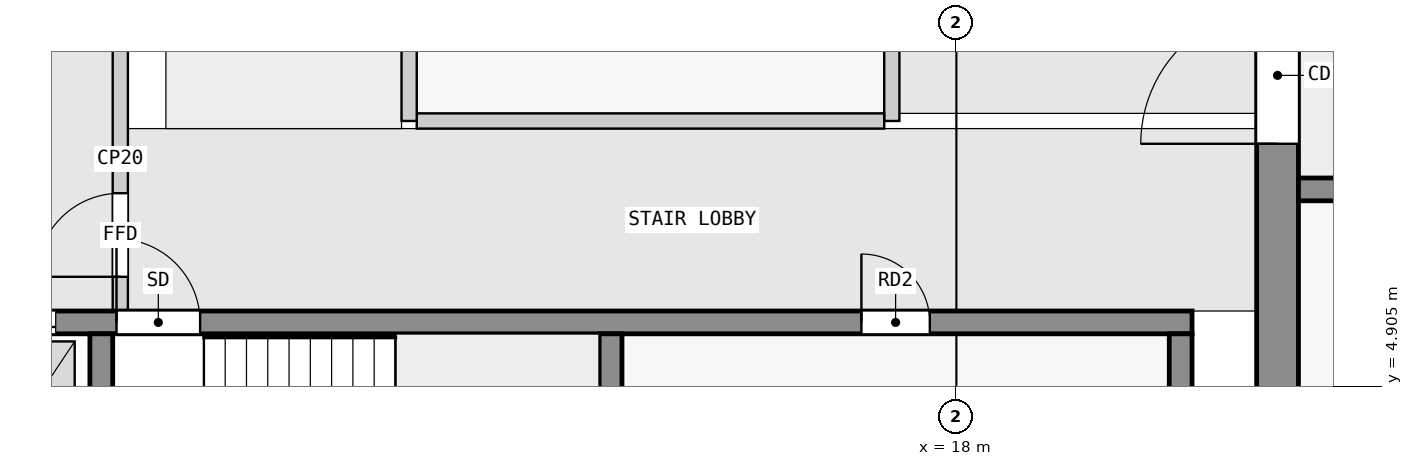
"""IFC4 building model, lengths in metres.
Left out: names, types, materials, properties, quantities, classifications, styles, units other than length and angle.
Written with IfcOpenShell. Run it as: python <this file> out.ifc"""

import sys

from ifc_helpers import new_model, si_unit, direction, frame, frame_2d, origin, place, context, subcontext, project, spatial, rectangle, extrude, element, fill, save


model = new_model("IFC4")
c1 = context("Model", 3, precision=1e-05, world=origin(), true_north=direction((0.0, 1.0)))
c2 = subcontext(c1, "Body", "Model", "MODEL_VIEW")
j1 = project(units=[si_unit("LENGTHUNIT", "METRE"), si_unit("PLANEANGLEUNIT", "RADIAN")], contexts=[c1])
p1 = place(None, origin())
s1 = spatial("IfcSite", under=j1, at=p1, CompositionType="ELEMENT")
p2 = place(p1, origin())
s2 = spatial("IfcBuilding", under=s1, at=p2, CompositionType="ELEMENT")
p3 = place(p2, frame((0.0, 0.0, 181.4)))
s3 = spatial("IfcBuildingStorey", under=s2, at=p3, CompositionType="ELEMENT", Elevation=181.4)
p4 = place(p3, frame((22.225, 2.5, 0.0), z_axis=(0.0, 0.0, 1.0), x_axis=(0.0, 1.0, 0.0)))
e1 = element("IfcWall", 1, at=p4, inside=s3, PredefinedType="SHEAR", context=c2, shape_type="SweptSolid", body=[
    extrude(rectangle(XDim=14.95, YDim=0.55, at=frame_2d((7.475, 0.0))), origin(), (0.0, 0.0, 1.0), 3.2),
])
p5 = place(p4, frame((5.6, 0.0, 0.0)))
e2 = element("IfcOpeningElement", 2, at=p5, cuts=e1, PredefinedType="OPENING", context=c2, shape_type="SweptSolid", body=[
    extrude(rectangle(XDim=1.8, YDim=2.1, at=frame_2d((0.9, 1.05))), frame((0.0, 0.285, 0.0), z_axis=(0.0, -1.0, 0.0), x_axis=(1.0, 0.0, 0.0)), (0.0, 0.0, 1.0), 0.57),
])
for number, where, z_axis, x_axis in (
    (3, (6.75, 2.8, 0.0), (0.0, 0.0, 1.0), (0.0, 1.0, 0.0)),
    (4, (13.45, 2.8, 0.0), (0.0, 0.0, 1.0), (0.0, 1.0, 0.0)),
    (5, (20.95, 2.8, 0.0), (0.0, 0.0, 1.0), (0.0, 1.0, 0.0)),
):
    element("IfcWall", number, at=place(p3, frame(where, z_axis=z_axis, x_axis=x_axis)), inside=s3, PredefinedType="SHEAR", context=c2, shape_type="SweptSolid", body=[
        extrude(rectangle(XDim=2.8, YDim=0.3, at=frame_2d((1.4, 0.0))), origin(), (0.0, 0.0, 1.0), 3.2),
    ])
p6 = place(p3, frame((2.3, 5.75, 0.0), z_axis=(0.0, 0.0, 1.0), x_axis=(1.0, 0.0, 0.0)))
e6 = element("IfcWall", 6, at=p6, inside=s3, PredefinedType="SHEAR", context=c2, shape_type="SweptSolid", body=[
    extrude(rectangle(XDim=18.8, YDim=0.3, at=frame_2d((9.4, 0.0))), origin(), (0.0, 0.0, 1.0), 3.2),
])
p7 = place(p6, frame((4.65, 0.0, 0.0)))
e7 = element("IfcOpeningElement", 7, at=p7, cuts=e6, PredefinedType="OPENING", context=c2, shape_type="SweptSolid", body=[
    extrude(rectangle(XDim=1.1, YDim=2.1, at=frame_2d((0.55, 1.05))), frame((0.0, 0.16, 0.0), z_axis=(0.0, -1.0, 0.0), x_axis=(1.0, 0.0, 0.0)), (0.0, 0.0, 1.0), 0.32),
])
p8 = place(p6, frame((0.45, 0.0, 0.0)))
e8 = element("IfcOpeningElement", 8, at=p8, cuts=e6, PredefinedType="OPENING", context=c2, shape_type="SweptSolid", body=[
    extrude(rectangle(XDim=1.1, YDim=2.1, at=frame_2d((0.55, 1.05))), frame((0.0, 0.16, 0.0), z_axis=(0.0, -1.0, 0.0), x_axis=(1.0, 0.0, 0.0)), (0.0, 0.0, 1.0), 0.32),
])
p9 = place(p6, frame((2.75, 0.0, 0.0)))
e9 = element("IfcOpeningElement", 9, at=p9, cuts=e6, PredefinedType="OPENING", context=c2, shape_type="SweptSolid", body=[
    extrude(rectangle(XDim=1.1, YDim=2.1, at=frame_2d((0.55, 1.05))), frame((0.0, 0.16, 0.0), z_axis=(0.0, -1.0, 0.0), x_axis=(1.0, 0.0, 0.0)), (0.0, 0.0, 1.0), 0.32),
])
p10 = place(p6, frame((14.45, 0.0, 0.0)))
e10 = element("IfcOpeningElement", 10, at=p10, cuts=e6, PredefinedType="OPENING", context=c2, shape_type="SweptSolid", body=[
    extrude(rectangle(XDim=0.9, YDim=2.1, at=frame_2d((0.45, 1.05))), frame((0.0, 0.16, 0.0), z_axis=(0.0, -1.0, 0.0), x_axis=(1.0, 0.0, 0.0)), (0.0, 0.0, 1.0), 0.32),
])
p11 = place(p3, frame((22.5, 7.5, 0.0), z_axis=(0.0, 0.0, 1.0), x_axis=(1.0, 0.0, 0.0)))
e11 = element("IfcWall", 11, at=p11, inside=s3, PredefinedType="SHEAR", context=c2, shape_type="SweptSolid", body=[
    extrude(rectangle(XDim=22.5, YDim=0.3, at=frame_2d((11.25, 0.0))), origin(), (0.0, 0.0, 1.0), 3.2),
])
p12 = place(p11, frame((3.65, 0.0, 0.0)))
e12 = element("IfcOpeningElement", 12, at=p12, cuts=e11, PredefinedType="OPENING", context=c2, shape_type="SweptSolid", body=[
    extrude(rectangle(XDim=1.8, YDim=2.1, at=frame_2d((0.9, 1.05))), frame((0.0, 0.16, 0.0), z_axis=(0.0, -1.0, 0.0), x_axis=(1.0, 0.0, 0.0)), (0.0, 0.0, 1.0), 0.32),
])
p13 = place(p11, frame((12.65, 0.0, 0.0)))
e13 = element("IfcOpeningElement", 13, at=p13, cuts=e11, PredefinedType="OPENING", context=c2, shape_type="SweptSolid", body=[
    extrude(rectangle(XDim=1.8, YDim=2.1, at=frame_2d((0.9, 1.05))), frame((0.0, 0.16, 0.0), z_axis=(0.0, -1.0, 0.0), x_axis=(1.0, 0.0, 0.0)), (0.0, 0.0, 1.0), 0.32),
])
p14 = place(p11, frame((18.75, 0.0, 0.0)))
e14 = element("IfcOpeningElement", 14, at=p14, cuts=e11, PredefinedType="OPENING", context=c2, shape_type="SweptSolid", body=[
    extrude(rectangle(XDim=0.9, YDim=2.1, at=frame_2d((0.45, 1.05))), frame((0.0, 0.16, 0.0), z_axis=(0.0, -1.0, 0.0), x_axis=(1.0, 0.0, 0.0)), (0.0, 0.0, 1.0), 0.32),
])
p15 = place(p11, frame((20.95, 0.0, 0.0)))
e15 = element("IfcOpeningElement", 15, at=p15, cuts=e11, PredefinedType="OPENING", context=c2, shape_type="SweptSolid", body=[
    extrude(rectangle(XDim=1.0, YDim=2.1, at=frame_2d((0.5, 1.05))), frame((0.0, 0.16, 0.0), z_axis=(0.0, -1.0, 0.0), x_axis=(1.0, 0.0, 0.0)), (0.0, 0.0, 1.0), 0.32),
])
p16 = place(p3, frame((7.0, 5.9, 0.0), z_axis=(0.0, 0.0, 1.0), x_axis=(0.0, 1.0, 0.0)))
e16 = element("IfcWall", 16, at=p16, inside=s3, PredefinedType="PARTITIONING", context=c2, shape_type="SweptSolid", body=[
    extrude(rectangle(XDim=4.0, YDim=0.2, at=frame_2d((2.0, 0.0))), origin(), (0.0, 0.0, 1.0), 3.2),
])
p17 = place(p16, frame((0.45, 0.0, 0.0)))
e17 = element("IfcOpeningElement", 17, at=p17, cuts=e16, PredefinedType="OPENING", context=c2, shape_type="SweptSolid", body=[
    extrude(rectangle(XDim=1.1, YDim=2.1, at=frame_2d((0.55, 1.05))), frame((0.0, 0.11, 0.0), z_axis=(0.0, -1.0, 0.0), x_axis=(1.0, 0.0, 0.0)), (0.0, 0.0, 1.0), 0.22),
])
p18 = place(p3, frame((10.8, 8.4, 0.0), z_axis=(0.0, 0.0, 1.0), x_axis=(0.0, 1.0, 0.0)))
e18 = element("IfcWall", 18, at=p18, inside=s3, PredefinedType="PARTITIONING", context=c2, shape_type="SweptSolid", body=[
    extrude(rectangle(XDim=3.8, YDim=0.2, at=frame_2d((1.9, 0.0))), origin(), (0.0, 0.0, 1.0), 3.2),
])
p19 = place(p3, frame((10.9, 8.4, 0.0), z_axis=(0.0, 0.0, 1.0), x_axis=(1.0, 0.0, 0.0)))
e19 = element("IfcWall", 19, at=p19, inside=s3, PredefinedType="PARTITIONING", context=c2, shape_type="SweptSolid", body=[
    extrude(rectangle(XDim=6.15, YDim=0.2, at=frame_2d((3.075, 0.0))), origin(), (0.0, 0.0, 1.0), 3.2),
])
p20 = place(p3, frame((17.15, 8.4, 0.0), z_axis=(0.0, 0.0, 1.0), x_axis=(0.0, 1.0, 0.0)))
e20 = element("IfcWall", 20, at=p20, inside=s3, PredefinedType="PARTITIONING", context=c2, shape_type="SweptSolid", body=[
    extrude(rectangle(XDim=3.8, YDim=0.2, at=frame_2d((1.9, 0.0))), origin(), (0.0, 0.0, 1.0), 3.2),
])
p21 = place(p17, origin())
e21 = element("IfcDoor", 21, at=p21, inside=s3, OperationType="SINGLE_SWING_LEFT", PredefinedType="DOOR", context=c2, shape_type="SweptSolid", body=[
    extrude(rectangle(XDim=1.1, YDim=2.1, at=frame_2d((0.55, 1.05))), frame((0.0, 0.025, 0.0), z_axis=(0.0, -1.0, 0.0), x_axis=(1.0, 0.0, 0.0)), (0.0, 0.0, 1.0), 0.05),
])
fill(e17, e21)
p22 = place(p7, origin())
e22 = element("IfcDoor", 22, at=p22, inside=s3, OperationType="SINGLE_SWING_LEFT", PredefinedType="DOOR", context=c2, shape_type="SweptSolid", body=[
    extrude(rectangle(XDim=1.1, YDim=2.1, at=frame_2d((0.55, 1.05))), frame((0.0, 0.025, 0.0), z_axis=(0.0, -1.0, 0.0), x_axis=(1.0, 0.0, 0.0)), (0.0, 0.0, 1.0), 0.05),
])
fill(e7, e22)
p23 = place(p9, origin())
e23 = element("IfcDoor", 23, at=p23, inside=s3, OperationType="DOUBLE_DOOR_SLIDING", PredefinedType="DOOR", context=c2, shape_type="SweptSolid", body=[
    extrude(rectangle(XDim=1.1, YDim=2.1, at=frame_2d((0.55, 1.05))), frame((0.0, 0.025, 0.0), z_axis=(0.0, -1.0, 0.0), x_axis=(1.0, 0.0, 0.0)), (0.0, 0.0, 1.0), 0.05),
])
fill(e9, e23)
p24 = place(p5, origin())
e24 = element("IfcDoor", 24, at=p24, inside=s3, OperationType="DOUBLE_DOOR_SINGLE_SWING", PredefinedType="DOOR", context=c2, shape_type="SweptSolid", body=[
    extrude(rectangle(XDim=1.8, YDim=2.1, at=frame_2d((0.9, 1.05))), frame((0.0, 0.025, 0.0), z_axis=(0.0, -1.0, 0.0), x_axis=(1.0, 0.0, 0.0)), (0.0, 0.0, 1.0), 0.05),
])
fill(e2, e24)
p25 = place(p10, origin())
e25 = element("IfcDoor", 25, at=p25, inside=s3, OperationType="SINGLE_SWING_LEFT", PredefinedType="DOOR", context=c2, shape_type="SweptSolid", body=[
    extrude(rectangle(XDim=0.9, YDim=2.1, at=frame_2d((0.45, 1.05))), frame((0.0, 0.025, 0.0), z_axis=(0.0, -1.0, 0.0), x_axis=(1.0, 0.0, 0.0)), (0.0, 0.0, 1.0), 0.05),
])
fill(e10, e25)
save(model, sys.argv[1])
